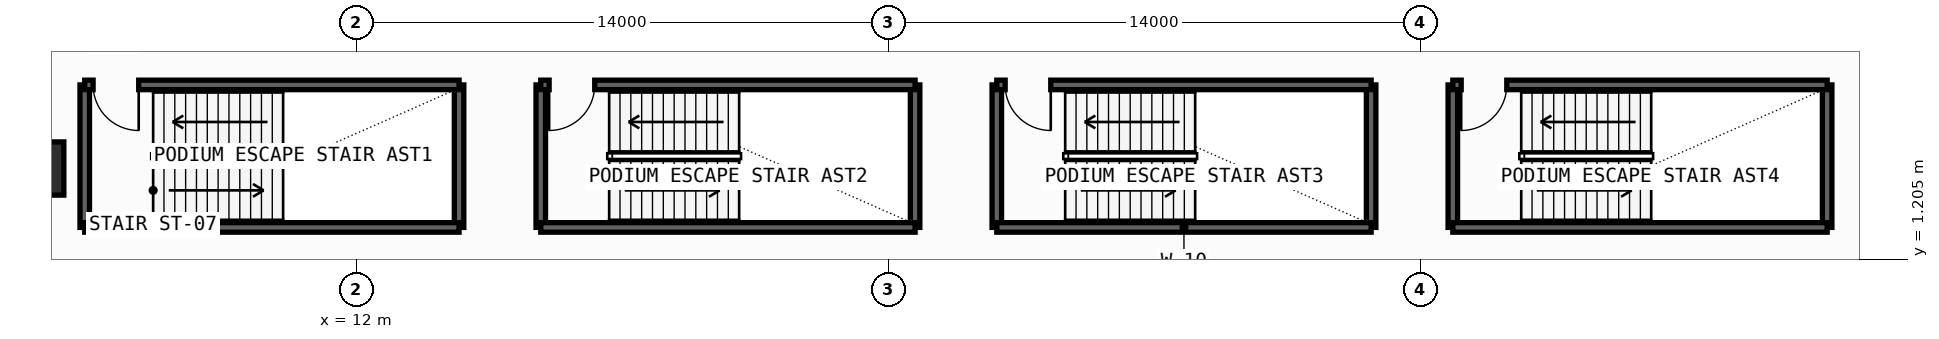
"""IFC4 building model, lengths in metres.
Left out: names, types, materials, properties, quantities, classifications, styles, units other than length and angle.
Written with IfcOpenShell. Run it as: python <this file> out.ifc"""

import sys

from ifc_helpers import new_model, si_unit, direction, frame, frame_2d, origin, origin_2d, place, context, subcontext, project, spatial, rectangle, extrude, element, fill, save


model = new_model("IFC4")
c1 = context("Model", 3, precision=1e-05, world=origin(), true_north=direction((0.0, 1.0)))
c2 = subcontext(c1, "Body", "Model", "MODEL_VIEW")
j1 = project(units=[si_unit("LENGTHUNIT", "METRE"), si_unit("PLANEANGLEUNIT", "RADIAN")], contexts=[c1])
p1 = place(None, origin())
s1 = spatial("IfcSite", under=j1, at=p1, CompositionType="ELEMENT")
p2 = place(p1, origin())
s2 = spatial("IfcBuilding", under=s1, at=p2, CompositionType="ELEMENT")
p3 = place(p2, frame((0.0, 0.0, 4.5)))
s3 = spatial("IfcBuildingStorey", under=s2, at=p3, CompositionType="ELEMENT", Elevation=4.5)
p4 = place(p3, frame((3.6, 3.6, 0.0), z_axis=(0.0, 0.0, 1.0), x_axis=(1.0, 0.0, 0.0)))
e1 = element("IfcColumn", 1, at=p4, inside=s3, PredefinedType="COLUMN", context=c2, shape_type="SweptSolid", body=[
    extrude(rectangle(XDim=1.4, YDim=1.4, at=origin_2d()), origin(), (0.0, 0.0, 1.0), 4.5),
])
for number, where, z_axis, x_axis in (
    (2, (4.85, 2.05, -0.32), (0.0, 0.0, 1.0), (0.0, 1.0, 0.0)),
    (3, (14.7, 2.05, -0.32), (0.0, 0.0, 1.0), (0.0, 1.0, 0.0)),
):
    element("IfcWall", number, at=place(p3, frame(where, z_axis=z_axis, x_axis=x_axis)), inside=s3, PredefinedType="SOLIDWALL", context=c2, shape_type="SweptSolid", body=[
        extrude(rectangle(XDim=3.75, YDim=0.25, at=frame_2d((1.875, 0.0))), origin(), (0.0, 0.0, 1.0), 4.5),
    ])
p5 = place(p3, frame((4.85, 2.05, -0.32), z_axis=(0.0, 0.0, 1.0), x_axis=(1.0, 0.0, 0.0)))
e4 = element("IfcWall", 4, at=p5, inside=s3, PredefinedType="SOLIDWALL", context=c2, shape_type="SweptSolid", body=[
    extrude(rectangle(XDim=9.85, YDim=0.25, at=frame_2d((4.925, 0.0))), origin(), (0.0, 0.0, 1.0), 4.5),
])
p6 = place(p3, frame((4.85, 5.8, -0.32), z_axis=(0.0, 0.0, 1.0), x_axis=(1.0, 0.0, 0.0)))
e5 = element("IfcWall", 5, at=p6, inside=s3, PredefinedType="SOLIDWALL", context=c2, shape_type="SweptSolid", body=[
    extrude(rectangle(XDim=9.85, YDim=0.25, at=frame_2d((4.925, 0.0))), origin(), (0.0, 0.0, 1.0), 4.5),
])
p7 = place(p6, frame((0.22, 0.0, 0.32)))
e6 = element("IfcOpeningElement", 6, at=p7, cuts=e5, PredefinedType="OPENING", context=c2, shape_type="SweptSolid", body=[
    extrude(rectangle(XDim=1.2, YDim=2.2, at=frame_2d((0.6, 1.1))), frame((0.0, 0.135, 0.0), z_axis=(0.0, -1.0, 0.0), x_axis=(1.0, 0.0, 0.0)), (0.0, 0.0, 1.0), 0.27),
])
for number, where, z_axis, x_axis in (
    (7, (16.85, 2.05, -0.32), (0.0, 0.0, 1.0), (0.0, 1.0, 0.0)),
    (8, (26.7, 2.05, -0.32), (0.0, 0.0, 1.0), (0.0, 1.0, 0.0)),
):
    element("IfcWall", number, at=place(p3, frame(where, z_axis=z_axis, x_axis=x_axis)), inside=s3, PredefinedType="SOLIDWALL", context=c2, shape_type="SweptSolid", body=[
        extrude(rectangle(XDim=3.75, YDim=0.25, at=frame_2d((1.875, 0.0))), origin(), (0.0, 0.0, 1.0), 4.5),
    ])
p8 = place(p3, frame((16.85, 2.05, -0.32), z_axis=(0.0, 0.0, 1.0), x_axis=(1.0, 0.0, 0.0)))
e9 = element("IfcWall", 9, at=p8, inside=s3, PredefinedType="SOLIDWALL", context=c2, shape_type="SweptSolid", body=[
    extrude(rectangle(XDim=9.85, YDim=0.25, at=frame_2d((4.925, 0.0))), origin(), (0.0, 0.0, 1.0), 4.5),
])
p9 = place(p3, frame((16.85, 5.8, -0.32), z_axis=(0.0, 0.0, 1.0), x_axis=(1.0, 0.0, 0.0)))
e10 = element("IfcWall", 10, at=p9, inside=s3, PredefinedType="SOLIDWALL", context=c2, shape_type="SweptSolid", body=[
    extrude(rectangle(XDim=9.85, YDim=0.25, at=frame_2d((4.925, 0.0))), origin(), (0.0, 0.0, 1.0), 4.5),
])
p10 = place(p9, frame((0.22, 0.0, 0.32)))
e11 = element("IfcOpeningElement", 11, at=p10, cuts=e10, PredefinedType="OPENING", context=c2, shape_type="SweptSolid", body=[
    extrude(rectangle(XDim=1.2, YDim=2.2, at=frame_2d((0.6, 1.1))), frame((0.0, 0.135, 0.0), z_axis=(0.0, -1.0, 0.0), x_axis=(1.0, 0.0, 0.0)), (0.0, 0.0, 1.0), 0.27),
])
for number, where, z_axis, x_axis in (
    (12, (28.85, 2.05, -0.32), (0.0, 0.0, 1.0), (0.0, 1.0, 0.0)),
    (13, (38.7, 2.05, -0.32), (0.0, 0.0, 1.0), (0.0, 1.0, 0.0)),
):
    element("IfcWall", number, at=place(p3, frame(where, z_axis=z_axis, x_axis=x_axis)), inside=s3, PredefinedType="SOLIDWALL", context=c2, shape_type="SweptSolid", body=[
        extrude(rectangle(XDim=3.75, YDim=0.25, at=frame_2d((1.875, 0.0))), origin(), (0.0, 0.0, 1.0), 4.5),
    ])
p11 = place(p3, frame((28.85, 2.05, -0.32), z_axis=(0.0, 0.0, 1.0), x_axis=(1.0, 0.0, 0.0)))
e14 = element("IfcWall", 14, at=p11, inside=s3, PredefinedType="SOLIDWALL", context=c2, shape_type="SweptSolid", body=[
    extrude(rectangle(XDim=9.85, YDim=0.25, at=frame_2d((4.925, 0.0))), origin(), (0.0, 0.0, 1.0), 4.5),
])
p12 = place(p3, frame((28.85, 5.8, -0.32), z_axis=(0.0, 0.0, 1.0), x_axis=(1.0, 0.0, 0.0)))
e15 = element("IfcWall", 15, at=p12, inside=s3, PredefinedType="SOLIDWALL", context=c2, shape_type="SweptSolid", body=[
    extrude(rectangle(XDim=9.85, YDim=0.25, at=frame_2d((4.925, 0.0))), origin(), (0.0, 0.0, 1.0), 4.5),
])
p13 = place(p12, frame((0.22, 0.0, 0.32)))
e16 = element("IfcOpeningElement", 16, at=p13, cuts=e15, PredefinedType="OPENING", context=c2, shape_type="SweptSolid", body=[
    extrude(rectangle(XDim=1.2, YDim=2.2, at=frame_2d((0.6, 1.1))), frame((0.0, 0.135, 0.0), z_axis=(0.0, -1.0, 0.0), x_axis=(1.0, 0.0, 0.0)), (0.0, 0.0, 1.0), 0.27),
])
for number, where, z_axis, x_axis in (
    (17, (40.85, 2.05, -0.32), (0.0, 0.0, 1.0), (0.0, 1.0, 0.0)),
    (18, (50.7, 2.05, -0.32), (0.0, 0.0, 1.0), (0.0, 1.0, 0.0)),
):
    element("IfcWall", number, at=place(p3, frame(where, z_axis=z_axis, x_axis=x_axis)), inside=s3, PredefinedType="SOLIDWALL", context=c2, shape_type="SweptSolid", body=[
        extrude(rectangle(XDim=3.75, YDim=0.25, at=frame_2d((1.875, 0.0))), origin(), (0.0, 0.0, 1.0), 4.5),
    ])
p14 = place(p3, frame((40.85, 2.05, -0.32), z_axis=(0.0, 0.0, 1.0), x_axis=(1.0, 0.0, 0.0)))
e19 = element("IfcWall", 19, at=p14, inside=s3, PredefinedType="SOLIDWALL", context=c2, shape_type="SweptSolid", body=[
    extrude(rectangle(XDim=9.85, YDim=0.25, at=frame_2d((4.925, 0.0))), origin(), (0.0, 0.0, 1.0), 4.5),
])
p15 = place(p3, frame((40.85, 5.8, -0.32), z_axis=(0.0, 0.0, 1.0), x_axis=(1.0, 0.0, 0.0)))
e20 = element("IfcWall", 20, at=p15, inside=s3, PredefinedType="SOLIDWALL", context=c2, shape_type="SweptSolid", body=[
    extrude(rectangle(XDim=9.85, YDim=0.25, at=frame_2d((4.925, 0.0))), origin(), (0.0, 0.0, 1.0), 4.5),
])
p16 = place(p15, frame((0.22, 0.0, 0.32)))
e21 = element("IfcOpeningElement", 21, at=p16, cuts=e20, PredefinedType="OPENING", context=c2, shape_type="SweptSolid", body=[
    extrude(rectangle(XDim=1.2, YDim=2.2, at=frame_2d((0.6, 1.1))), frame((0.0, 0.135, 0.0), z_axis=(0.0, -1.0, 0.0), x_axis=(1.0, 0.0, 0.0)), (0.0, 0.0, 1.0), 0.27),
])
p17 = place(p7, frame((1.2, 0.0, 0.0), z_axis=(0.0, 0.0, 1.0), x_axis=(-1.0, 0.0, 0.0)))
e22 = element("IfcDoor", 22, at=p17, inside=s3, OperationType="SINGLE_SWING_LEFT", PredefinedType="USERDEFINED", context=c2, shape_type="SweptSolid", body=[
    extrude(rectangle(XDim=1.2, YDim=2.2, at=frame_2d((0.6, 1.1))), frame((0.0, 0.025, 0.0), z_axis=(0.0, -1.0, 0.0), x_axis=(1.0, 0.0, 0.0)), (0.0, 0.0, 1.0), 0.05),
])
fill(e6, e22)
p18 = place(p10, frame((1.2, 0.0, 0.0), z_axis=(0.0, 0.0, 1.0), x_axis=(-1.0, 0.0, 0.0)))
e23 = element("IfcDoor", 23, at=p18, inside=s3, OperationType="SINGLE_SWING_RIGHT", PredefinedType="USERDEFINED", context=c2, shape_type="SweptSolid", body=[
    extrude(rectangle(XDim=1.2, YDim=2.2, at=frame_2d((0.6, 1.1))), frame((0.0, 0.025, 0.0), z_axis=(0.0, -1.0, 0.0), x_axis=(1.0, 0.0, 0.0)), (0.0, 0.0, 1.0), 0.05),
])
fill(e11, e23)
p19 = place(p13, frame((1.2, 0.0, 0.0), z_axis=(0.0, 0.0, 1.0), x_axis=(-1.0, 0.0, 0.0)))
e24 = element("IfcDoor", 24, at=p19, inside=s3, OperationType="SINGLE_SWING_LEFT", PredefinedType="USERDEFINED", context=c2, shape_type="SweptSolid", body=[
    extrude(rectangle(XDim=1.2, YDim=2.2, at=frame_2d((0.6, 1.1))), frame((0.0, 0.025, 0.0), z_axis=(0.0, -1.0, 0.0), x_axis=(1.0, 0.0, 0.0)), (0.0, 0.0, 1.0), 0.05),
])
fill(e16, e24)
p20 = place(p16, frame((1.2, 0.0, 0.0), z_axis=(0.0, 0.0, 1.0), x_axis=(-1.0, 0.0, 0.0)))
e25 = element("IfcDoor", 25, at=p20, inside=s3, OperationType="SINGLE_SWING_RIGHT", PredefinedType="USERDEFINED", context=c2, shape_type="SweptSolid", body=[
    extrude(rectangle(XDim=1.2, YDim=2.2, at=frame_2d((0.6, 1.1))), frame((0.0, 0.025, 0.0), z_axis=(0.0, -1.0, 0.0), x_axis=(1.0, 0.0, 0.0)), (0.0, 0.0, 1.0), 0.05),
])
fill(e21, e25)
save(model, sys.argv[1])
